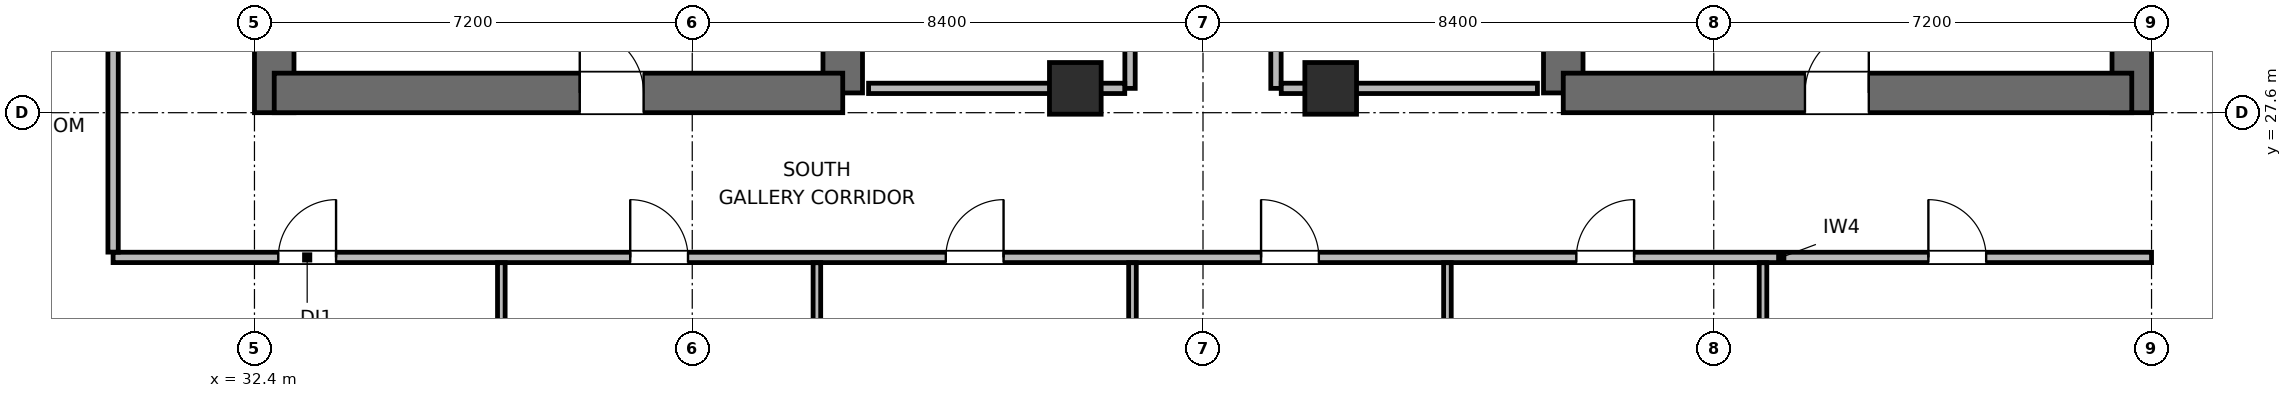
"""IFC4 building model, lengths in metres.
Left out: names, types, materials, properties, quantities, classifications, styles, units other than length and angle.
Written with IfcOpenShell. Run it as: python <this file> out.ifc"""

import sys

from ifc_helpers import new_model, si_unit, direction, frame, frame_2d, origin, origin_2d, place, context, subcontext, project, spatial, rectangle, extrude, element, fill, save


model = new_model("IFC4")
c1 = context("Model", 3, precision=1e-05, world=origin(), true_north=direction((0.0, 1.0)))
c2 = subcontext(c1, "Body", "Model", "MODEL_VIEW")
j1 = project(units=[si_unit("LENGTHUNIT", "METRE"), si_unit("PLANEANGLEUNIT", "RADIAN")], contexts=[c1])
p1 = place(None, origin())
s1 = spatial("IfcSite", under=j1, at=p1, CompositionType="ELEMENT")
p2 = place(p1, origin())
s2 = spatial("IfcBuilding", under=s1, at=p2, CompositionType="ELEMENT")
p3 = place(p2, frame((0.0, 0.0, 251.1)))
s3 = spatial("IfcBuildingStorey", under=s2, at=p3, CompositionType="ELEMENT", Elevation=251.1)
p4 = place(p3, frame((32.725, 27.6, 0.0), z_axis=(0.0, 0.0, 1.0), x_axis=(0.0, 1.0, 0.0)))
e1 = element("IfcWall", 1, at=p4, inside=s3, PredefinedType="SHEAR", context=c2, shape_type="SweptSolid", body=[
    extrude(rectangle(XDim=16.8, YDim=0.65, at=frame_2d((8.4, 0.0))), origin(), (0.0, 0.0, 1.0), 3.9),
])
p5 = place(p3, frame((42.075, 27.925, 0.0), z_axis=(0.0, 0.0, 1.0), x_axis=(0.0, 1.0, 0.0)))
e2 = element("IfcWall", 2, at=p5, inside=s3, PredefinedType="SHEAR", context=c2, shape_type="SweptSolid", body=[
    extrude(rectangle(XDim=6.475, YDim=0.65, at=frame_2d((3.237, 0.0))), origin(), (0.0, 0.0, 1.0), 3.9),
])
p6 = place(p3, frame((32.725, 27.925, 0.0), z_axis=(0.0, 0.0, 1.0), x_axis=(1.0, 0.0, 0.0)))
e3 = element("IfcWall", 3, at=p6, inside=s3, PredefinedType="SHEAR", context=c2, shape_type="SweptSolid", body=[
    extrude(rectangle(XDim=9.35, YDim=0.65, at=frame_2d((4.675, 0.0))), origin(), (0.0, 0.0, 1.0), 3.9),
])
p7 = place(p6, frame((5.025, 0.0, 0.0)))
e4 = element("IfcOpeningElement", 4, at=p7, cuts=e3, PredefinedType="OPENING", context=c2, shape_type="SweptSolid", body=[
    extrude(rectangle(XDim=1.05, YDim=2.04, at=frame_2d((0.525, 1.02))), frame((0.0, 0.335, 0.0), z_axis=(0.0, -1.0, 0.0), x_axis=(1.0, 0.0, 0.0)), (0.0, 0.0, 1.0), 0.67),
])
p8 = place(p3, frame((53.925, 27.925, 0.0), z_axis=(0.0, 0.0, 1.0), x_axis=(0.0, 1.0, 0.0)))
e5 = element("IfcWall", 5, at=p8, inside=s3, PredefinedType="SHEAR", context=c2, shape_type="SweptSolid", body=[
    extrude(rectangle(XDim=7.875, YDim=0.65, at=frame_2d((3.938, 0.0))), origin(), (0.0, 0.0, 1.0), 3.9),
])
p9 = place(p3, frame((63.275, 27.6, 0.0), z_axis=(0.0, 0.0, 1.0), x_axis=(0.0, 1.0, 0.0)))
e6 = element("IfcWall", 6, at=p9, inside=s3, PredefinedType="SHEAR", context=c2, shape_type="SweptSolid", body=[
    extrude(rectangle(XDim=16.8, YDim=0.65, at=frame_2d((8.4, 0.0))), origin(), (0.0, 0.0, 1.0), 3.9),
])
p10 = place(p3, frame((53.925, 27.925, 0.0), z_axis=(0.0, 0.0, 1.0), x_axis=(1.0, 0.0, 0.0)))
e7 = element("IfcWall", 7, at=p10, inside=s3, PredefinedType="SHEAR", context=c2, shape_type="SweptSolid", body=[
    extrude(rectangle(XDim=9.35, YDim=0.65, at=frame_2d((4.675, 0.0))), origin(), (0.0, 0.0, 1.0), 3.9),
])
p11 = place(p10, frame((3.975, 0.0, 0.0)))
e8 = element("IfcOpeningElement", 8, at=p11, cuts=e7, PredefinedType="OPENING", context=c2, shape_type="SweptSolid", body=[
    extrude(rectangle(XDim=1.05, YDim=2.04, at=frame_2d((0.525, 1.02))), frame((0.0, 0.335, 0.0), z_axis=(0.0, -1.0, 0.0), x_axis=(1.0, 0.0, 0.0)), (0.0, 0.0, 1.0), 0.67),
])
for number, where, z_axis, x_axis in (
    (9, (45.9, 28.0, 0.0), (0.0, 0.0, 1.0), (1.0, 0.0, 0.0)),
    (10, (50.1, 28.0, 0.0), (0.0, 0.0, 1.0), (1.0, 0.0, 0.0)),
):
    element("IfcColumn", number, at=place(p3, frame(where, z_axis=z_axis, x_axis=x_axis)), inside=s3, PredefinedType="COLUMN", context=c2, shape_type="SweptSolid", body=[
        extrude(rectangle(XDim=0.85, YDim=0.85, at=origin_2d()), origin(), (0.0, 0.0, 1.0), 3.9),
    ])
p12 = place(p3, frame((46.8, 28.0, 0.0), z_axis=(0.0, 0.0, 1.0), x_axis=(0.0, 1.0, 0.0)))
e11 = element("IfcWall", 11, at=p12, inside=s3, PredefinedType="PARTITIONING", context=c2, shape_type="SweptSolid", body=[
    extrude(rectangle(XDim=4.5, YDim=0.17, at=frame_2d((2.25, 0.0))), origin(), (0.0, 0.0, 1.0), 3.68),
])
p13 = place(p12, frame((0.675, 0.0, 0.0)))
e12 = element("IfcOpeningElement", 12, at=p13, cuts=e11, PredefinedType="OPENING", context=c2, shape_type="SweptSolid", body=[
    extrude(rectangle(XDim=0.9, YDim=2.02, at=frame_2d((0.45, 1.01))), frame((0.0, 0.095, 0.0), z_axis=(0.0, -1.0, 0.0), x_axis=(1.0, 0.0, 0.0)), (0.0, 0.0, 1.0), 0.19),
])
p14 = place(p12, frame((2.925, 0.0, 0.0)))
e13 = element("IfcOpeningElement", 13, at=p14, cuts=e11, PredefinedType="OPENING", context=c2, shape_type="SweptSolid", body=[
    extrude(rectangle(XDim=0.9, YDim=2.02, at=frame_2d((0.45, 1.01))), frame((0.0, 0.095, 0.0), z_axis=(0.0, -1.0, 0.0), x_axis=(1.0, 0.0, 0.0)), (0.0, 0.0, 1.0), 0.19),
])
p15 = place(p3, frame((42.5, 28.0, 0.0), z_axis=(0.0, 0.0, 1.0), x_axis=(1.0, 0.0, 0.0)))
e14 = element("IfcWall", 14, at=p15, inside=s3, PredefinedType="PARTITIONING", context=c2, shape_type="SweptSolid", body=[
    extrude(rectangle(XDim=4.213, YDim=0.17, at=frame_2d((2.106, 0.0))), origin(), (0.0, 0.0, 1.0), 2.765),
])
p16 = place(p3, frame((49.2, 28.0, 0.0), z_axis=(0.0, 0.0, 1.0), x_axis=(0.0, 1.0, 0.0)))
e15 = element("IfcWall", 15, at=p16, inside=s3, PredefinedType="PARTITIONING", context=c2, shape_type="SweptSolid", body=[
    extrude(rectangle(XDim=4.5, YDim=0.17, at=frame_2d((2.25, 0.0))), origin(), (0.0, 0.0, 1.0), 3.68),
])
p17 = place(p16, frame((1.8, 0.0, 0.0)))
e16 = element("IfcOpeningElement", 16, at=p17, cuts=e15, PredefinedType="OPENING", context=c2, shape_type="SweptSolid", body=[
    extrude(rectangle(XDim=0.9, YDim=2.02, at=frame_2d((0.45, 1.01))), frame((0.0, 0.095, 0.0), z_axis=(0.0, -1.0, 0.0), x_axis=(1.0, 0.0, 0.0)), (0.0, 0.0, 1.0), 0.19),
])
p18 = place(p3, frame((49.287, 28.0, 0.0), z_axis=(0.0, 0.0, 1.0), x_axis=(1.0, 0.0, 0.0)))
e17 = element("IfcWall", 17, at=p18, inside=s3, PredefinedType="PARTITIONING", context=c2, shape_type="SweptSolid", body=[
    extrude(rectangle(XDim=4.213, YDim=0.17, at=frame_2d((2.106, 0.0))), origin(), (0.0, 0.0, 1.0), 2.765),
])
p19 = place(p3, frame((30.075, 25.22, 0.0), z_axis=(0.0, 0.0, 1.0), x_axis=(1.0, 0.0, 0.0)))
e18 = element("IfcWall", 18, at=p19, inside=s3, PredefinedType="PARTITIONING", context=c2, shape_type="SweptSolid", body=[
    extrude(rectangle(XDim=33.525, YDim=0.17, at=frame_2d((16.763, 0.0))), origin(), (0.0, 0.0, 1.0), 3.68),
])
p20 = place(p19, frame((2.717, 0.0, 0.0)))
e19 = element("IfcOpeningElement", 19, at=p20, cuts=e18, PredefinedType="OPENING", context=c2, shape_type="SweptSolid", body=[
    extrude(rectangle(XDim=0.95, YDim=2.04, at=frame_2d((0.475, 1.02))), frame((0.0, 0.095, 0.0), z_axis=(0.0, -1.0, 0.0), x_axis=(1.0, 0.0, 0.0)), (0.0, 0.0, 1.0), 0.19),
])
p21 = place(p19, frame((8.505, 0.0, 0.0)))
e20 = element("IfcOpeningElement", 20, at=p21, cuts=e18, PredefinedType="OPENING", context=c2, shape_type="SweptSolid", body=[
    extrude(rectangle(XDim=0.95, YDim=2.04, at=frame_2d((0.475, 1.02))), frame((0.0, 0.095, 0.0), z_axis=(0.0, -1.0, 0.0), x_axis=(1.0, 0.0, 0.0)), (0.0, 0.0, 1.0), 0.19),
])
p22 = place(p19, frame((13.695, 0.0, 0.0)))
e21 = element("IfcOpeningElement", 21, at=p22, cuts=e18, PredefinedType="OPENING", context=c2, shape_type="SweptSolid", body=[
    extrude(rectangle(XDim=0.95, YDim=2.04, at=frame_2d((0.475, 1.02))), frame((0.0, 0.095, 0.0), z_axis=(0.0, -1.0, 0.0), x_axis=(1.0, 0.0, 0.0)), (0.0, 0.0, 1.0), 0.19),
])
p23 = place(p19, frame((18.88, 0.0, 0.0)))
e22 = element("IfcOpeningElement", 22, at=p23, cuts=e18, PredefinedType="OPENING", context=c2, shape_type="SweptSolid", body=[
    extrude(rectangle(XDim=0.95, YDim=2.04, at=frame_2d((0.475, 1.02))), frame((0.0, 0.095, 0.0), z_axis=(0.0, -1.0, 0.0), x_axis=(1.0, 0.0, 0.0)), (0.0, 0.0, 1.0), 0.19),
])
p24 = place(p19, frame((24.065, 0.0, 0.0)))
e23 = element("IfcOpeningElement", 23, at=p24, cuts=e18, PredefinedType="OPENING", context=c2, shape_type="SweptSolid", body=[
    extrude(rectangle(XDim=0.95, YDim=2.04, at=frame_2d((0.475, 1.02))), frame((0.0, 0.095, 0.0), z_axis=(0.0, -1.0, 0.0), x_axis=(1.0, 0.0, 0.0)), (0.0, 0.0, 1.0), 0.19),
])
p25 = place(p19, frame((29.855, 0.0, 0.0)))
e24 = element("IfcOpeningElement", 24, at=p25, cuts=e18, PredefinedType="OPENING", context=c2, shape_type="SweptSolid", body=[
    extrude(rectangle(XDim=0.95, YDim=2.04, at=frame_2d((0.475, 1.02))), frame((0.0, 0.095, 0.0), z_axis=(0.0, -1.0, 0.0), x_axis=(1.0, 0.0, 0.0)), (0.0, 0.0, 1.0), 0.19),
])
p26 = place(p3, frame((30.075, 25.307, 0.0), z_axis=(0.0, 0.0, 1.0), x_axis=(0.0, 1.0, 0.0)))
e25 = element("IfcWall", 25, at=p26, inside=s3, PredefinedType="PARTITIONING", context=c2, shape_type="SweptSolid", body=[
    extrude(rectangle(XDim=21.386, YDim=0.17, at=frame_2d((10.693, 0.0))), origin(), (0.0, 0.0, 1.0), 3.68),
])
p27 = place(p26, frame((4.428, 0.0, 0.0)))
e26 = element("IfcOpeningElement", 26, at=p27, cuts=e25, PredefinedType="OPENING", context=c2, shape_type="SweptSolid", body=[
    extrude(rectangle(XDim=0.95, YDim=2.04, at=frame_2d((0.475, 1.02))), frame((0.0, 0.095, 0.0), z_axis=(0.0, -1.0, 0.0), x_axis=(1.0, 0.0, 0.0)), (0.0, 0.0, 1.0), 0.19),
])
p28 = place(p26, frame((15.208, 0.0, 0.0)))
e27 = element("IfcOpeningElement", 27, at=p28, cuts=e25, PredefinedType="OPENING", context=c2, shape_type="SweptSolid", body=[
    extrude(rectangle(XDim=0.95, YDim=2.04, at=frame_2d((0.475, 1.02))), frame((0.0, 0.095, 0.0), z_axis=(0.0, -1.0, 0.0), x_axis=(1.0, 0.0, 0.0)), (0.0, 0.0, 1.0), 0.19),
])
p29 = place(p3, frame((36.46, 18.875, 0.0), z_axis=(0.0, 0.0, 1.0), x_axis=(0.0, 1.0, 0.0)))
e28 = element("IfcWall", 28, at=p29, inside=s3, PredefinedType="PARTITIONING", context=c2, shape_type="SweptSolid", body=[
    extrude(rectangle(XDim=6.258, YDim=0.125, at=frame_2d((3.129, 0.0))), origin(), (0.0, 0.0, 1.0), 3.68),
])
p30 = place(p3, frame((41.65, 19.049, 0.0), z_axis=(0.0, 0.0, 1.0), x_axis=(0.0, 1.0, 0.0)))
e29 = element("IfcWall", 29, at=p30, inside=s3, PredefinedType="PARTITIONING", context=c2, shape_type="SweptSolid", body=[
    extrude(rectangle(XDim=6.084, YDim=0.125, at=frame_2d((3.042, 0.0))), origin(), (0.0, 0.0, 1.0), 3.043),
])
p31 = place(p3, frame((46.84, 22.355, 0.0), z_axis=(0.0, 0.0, 1.0), x_axis=(0.0, 1.0, 0.0)))
e30 = element("IfcWall", 30, at=p31, inside=s3, PredefinedType="PARTITIONING", context=c2, shape_type="SweptSolid", body=[
    extrude(rectangle(XDim=2.778, YDim=0.125, at=frame_2d((1.389, 0.0))), origin(), (0.0, 0.0, 1.0), 3.68),
])
p32 = place(p3, frame((52.02, 20.283, 0.0), z_axis=(0.0, 0.0, 1.0), x_axis=(0.0, 1.0, 0.0)))
e31 = element("IfcWall", 31, at=p32, inside=s3, PredefinedType="PARTITIONING", context=c2, shape_type="SweptSolid", body=[
    extrude(rectangle(XDim=4.85, YDim=0.125, at=frame_2d((2.425, 0.0))), origin(), (0.0, 0.0, 1.0), 3.68),
])
p33 = place(p3, frame((57.21, 18.875, 0.0), z_axis=(0.0, 0.0, 1.0), x_axis=(0.0, 1.0, 0.0)))
e32 = element("IfcWall", 32, at=p33, inside=s3, PredefinedType="PARTITIONING", context=c2, shape_type="SweptSolid", body=[
    extrude(rectangle(XDim=6.258, YDim=0.125, at=frame_2d((3.129, 0.0))), origin(), (0.0, 0.0, 1.0), 3.68),
])
p34 = place(p7, origin())
e33 = element("IfcDoor", 33, at=p34, inside=s3, OperationType="SINGLE_SWING_LEFT", PredefinedType="DOOR", context=c2, shape_type="SweptSolid", body=[
    extrude(rectangle(XDim=1.05, YDim=2.04, at=frame_2d((0.525, 1.02))), frame((0.0, 0.025, 0.0), z_axis=(0.0, -1.0, 0.0), x_axis=(1.0, 0.0, 0.0)), (0.0, 0.0, 1.0), 0.05),
])
fill(e4, e33)
p35 = place(p11, origin())
e34 = element("IfcDoor", 34, at=p35, inside=s3, OperationType="SINGLE_SWING_RIGHT", PredefinedType="DOOR", context=c2, shape_type="SweptSolid", body=[
    extrude(rectangle(XDim=1.05, YDim=2.04, at=frame_2d((0.525, 1.02))), frame((0.0, 0.025, 0.0), z_axis=(0.0, -1.0, 0.0), x_axis=(1.0, 0.0, 0.0)), (0.0, 0.0, 1.0), 0.05),
])
fill(e8, e34)
p36 = place(p20, origin())
e35 = element("IfcDoor", 35, at=p36, inside=s3, OperationType="SINGLE_SWING_RIGHT", PredefinedType="DOOR", context=c2, shape_type="SweptSolid", body=[
    extrude(rectangle(XDim=0.95, YDim=2.04, at=frame_2d((0.475, 1.02))), frame((0.0, 0.025, 0.0), z_axis=(0.0, -1.0, 0.0), x_axis=(1.0, 0.0, 0.0)), (0.0, 0.0, 1.0), 0.05),
])
fill(e19, e35)
p37 = place(p21, origin())
e36 = element("IfcDoor", 36, at=p37, inside=s3, OperationType="SINGLE_SWING_LEFT", PredefinedType="DOOR", context=c2, shape_type="SweptSolid", body=[
    extrude(rectangle(XDim=0.95, YDim=2.04, at=frame_2d((0.475, 1.02))), frame((0.0, 0.025, 0.0), z_axis=(0.0, -1.0, 0.0), x_axis=(1.0, 0.0, 0.0)), (0.0, 0.0, 1.0), 0.05),
])
fill(e20, e36)
p38 = place(p22, origin())
e37 = element("IfcDoor", 37, at=p38, inside=s3, OperationType="SINGLE_SWING_RIGHT", PredefinedType="DOOR", context=c2, shape_type="SweptSolid", body=[
    extrude(rectangle(XDim=0.95, YDim=2.04, at=frame_2d((0.475, 1.02))), frame((0.0, 0.025, 0.0), z_axis=(0.0, -1.0, 0.0), x_axis=(1.0, 0.0, 0.0)), (0.0, 0.0, 1.0), 0.05),
])
fill(e21, e37)
p39 = place(p23, origin())
e38 = element("IfcDoor", 38, at=p39, inside=s3, OperationType="SINGLE_SWING_LEFT", PredefinedType="DOOR", context=c2, shape_type="SweptSolid", body=[
    extrude(rectangle(XDim=0.95, YDim=2.04, at=frame_2d((0.475, 1.02))), frame((0.0, 0.025, 0.0), z_axis=(0.0, -1.0, 0.0), x_axis=(1.0, 0.0, 0.0)), (0.0, 0.0, 1.0), 0.05),
])
fill(e22, e38)
p40 = place(p24, origin())
e39 = element("IfcDoor", 39, at=p40, inside=s3, OperationType="SINGLE_SWING_RIGHT", PredefinedType="DOOR", context=c2, shape_type="SweptSolid", body=[
    extrude(rectangle(XDim=0.95, YDim=2.04, at=frame_2d((0.475, 1.02))), frame((0.0, 0.025, 0.0), z_axis=(0.0, -1.0, 0.0), x_axis=(1.0, 0.0, 0.0)), (0.0, 0.0, 1.0), 0.05),
])
fill(e23, e39)
p41 = place(p25, origin())
e40 = element("IfcDoor", 40, at=p41, inside=s3, OperationType="SINGLE_SWING_LEFT", PredefinedType="DOOR", context=c2, shape_type="SweptSolid", body=[
    extrude(rectangle(XDim=0.95, YDim=2.04, at=frame_2d((0.475, 1.02))), frame((0.0, 0.025, 0.0), z_axis=(0.0, -1.0, 0.0), x_axis=(1.0, 0.0, 0.0)), (0.0, 0.0, 1.0), 0.05),
])
fill(e24, e40)
save(model, sys.argv[1])
